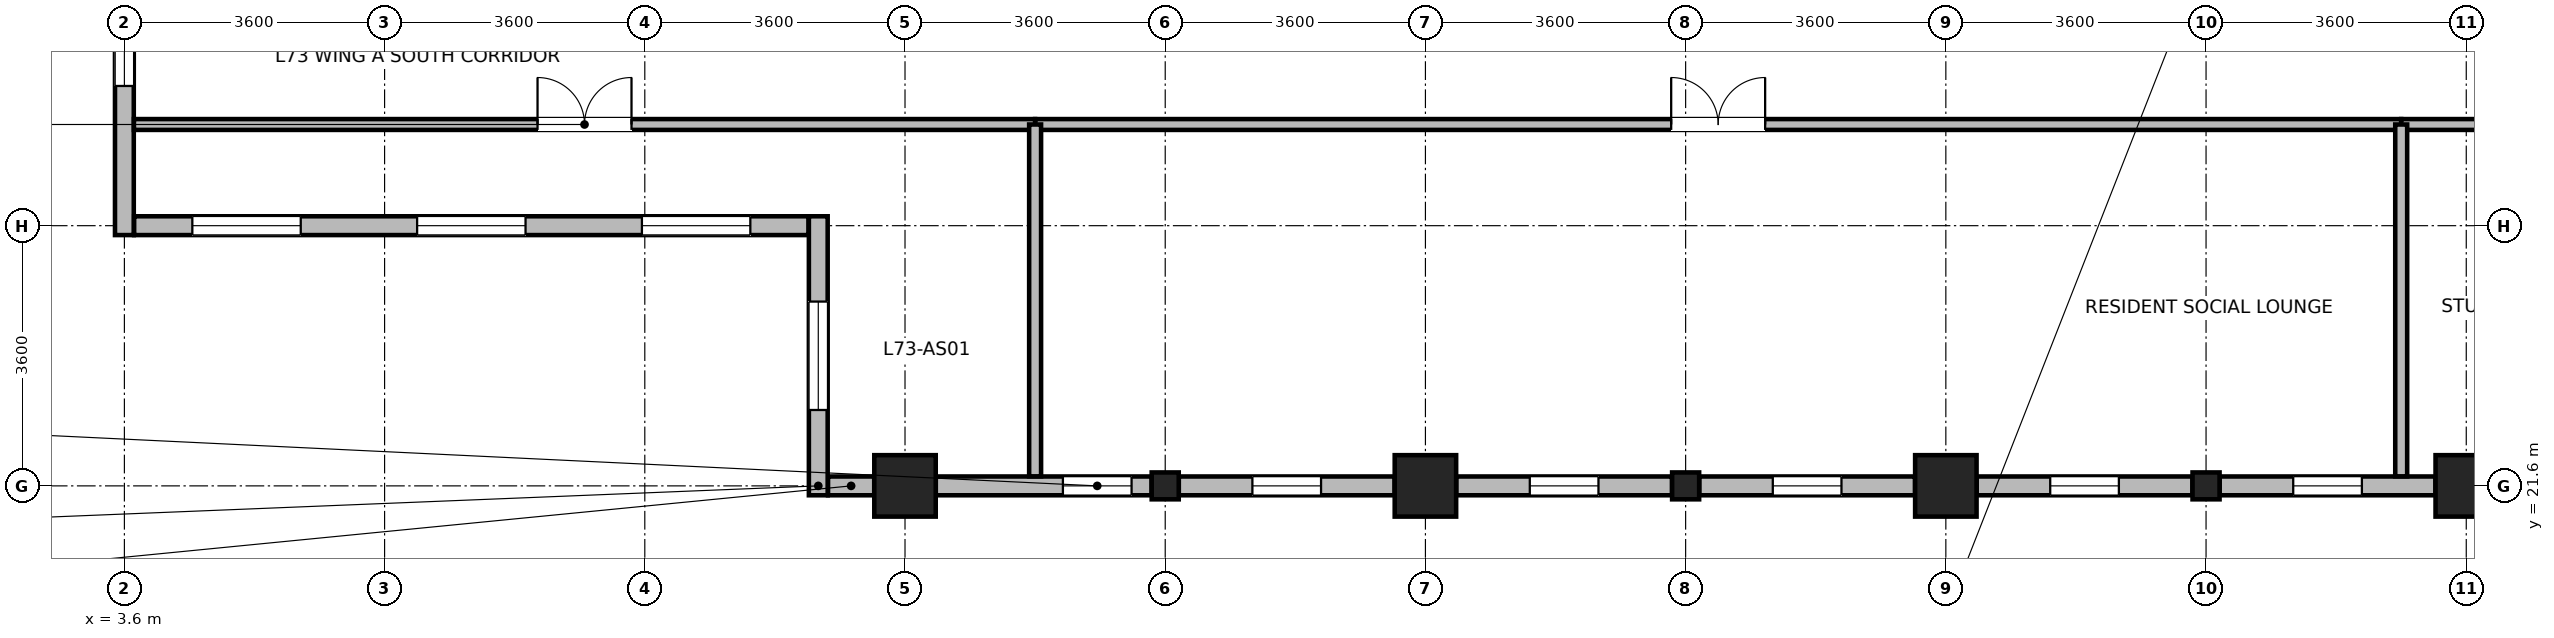
"""IFC4 building model, lengths in metres.
Left out: names, types, materials, properties, quantities, classifications, styles, units other than length and angle.
Written with IfcOpenShell. Run it as: python <this file> out.ifc"""

import sys

from ifc_helpers import new_model, si_unit, direction, frame, frame_2d, origin, origin_2d, place, context, subcontext, project, spatial, rectangle, i_section, extrude, source, transform, mapped, element, fill, save


model = new_model("IFC4")
c1 = context("Model", 3, precision=1e-05, world=origin(), true_north=direction((0.0, 1.0)))
c2 = subcontext(c1, "Body", "Model", "MODEL_VIEW")
j1 = project(units=[si_unit("LENGTHUNIT", "METRE"), si_unit("PLANEANGLEUNIT", "RADIAN")], contexts=[c1])
p1 = place(None, origin())
s1 = spatial("IfcSite", under=j1, at=p1, CompositionType="ELEMENT")
p2 = place(p1, origin())
s2 = spatial("IfcBuilding", under=s1, at=p2, CompositionType="ELEMENT")
p3 = place(p2, frame((0.0, 0.0, 283.2)))
s3 = spatial("IfcBuildingStorey", under=s2, at=p3, CompositionType="ELEMENT", Elevation=283.2)
m1 = source(origin(), c2, "Body", "SweptSolid", [
    extrude(rectangle(XDim=0.85, YDim=0.85, at=origin_2d()), origin(), (0.0, 0.0, 1.0), 3.7),
])
for number, where, z_axis, x_axis in (
    (1, (14.4, 21.6, 0.0), (0.0, 0.0, 1.0), (1.0, 0.0, 0.0)),
    (2, (21.6, 21.6, 0.0), (0.0, 0.0, 1.0), (1.0, 0.0, 0.0)),
    (3, (28.8, 21.6, 0.0), (0.0, 0.0, 1.0), (1.0, 0.0, 0.0)),
    (4, (36.0, 21.6, 0.0), (0.0, 0.0, 1.0), (1.0, 0.0, 0.0)),
):
    element("IfcColumn", number, at=place(p3, frame(where, z_axis=z_axis, x_axis=x_axis)), inside=s3, PredefinedType="COLUMN", context=c2, shape_type="MappedRepresentation", body=[
        mapped(m1, transform((0.0, 0.0, 0.0), x_axis=(1.0, 0.0, 0.0), y_axis=(0.0, 1.0, 0.0), z_axis=(0.0, 0.0, 1.0), scale=1.0)),
    ])
m2 = source(origin(), c2, "Body", "SweptSolid", [
    extrude(i_section(OverallWidth=0.374, OverallDepth=0.372, WebThickness=0.015, FlangeThickness=0.026, FilletRadius=0.015, at=origin_2d()), origin(), (0.0, 0.0, 1.0), 3.7),
])
for number, where, z_axis, x_axis in (
    (5, (18.0, 21.6, 0.0), (0.0, 0.0, 1.0), (1.0, 0.0, 0.0)),
    (6, (25.2, 21.6, 0.0), (0.0, 0.0, 1.0), (1.0, 0.0, 0.0)),
    (7, (32.4, 21.6, 0.0), (0.0, 0.0, 1.0), (1.0, 0.0, 0.0)),
):
    element("IfcColumn", number, at=place(p3, frame(where, z_axis=z_axis, x_axis=x_axis)), inside=s3, PredefinedType="COLUMN", context=c2, shape_type="MappedRepresentation", body=[
        mapped(m2, transform((0.0, 0.0, 0.0), x_axis=(1.0, 0.0, 0.0), y_axis=(0.0, 1.0, 0.0), z_axis=(0.0, 0.0, 1.0), scale=1.0)),
    ])
p4 = place(p3, frame((13.974, 21.6, 0.0), z_axis=(0.0, 0.0, 1.0), x_axis=(-1.0, 0.0, 0.0)))
e8 = element("IfcWall", 8, at=p4, inside=s3, PredefinedType="STANDARD", context=c2, shape_type="SweptSolid", body=[
    extrude(rectangle(XDim=0.639, YDim=0.26, at=frame_2d((0.32, 0.0))), origin(), (0.0, 0.0, 1.0), 3.455),
])
p5 = place(p3, frame((17.812, 21.6, 0.0), z_axis=(0.0, 0.0, 1.0), x_axis=(-1.0, 0.0, 0.0)))
e9 = element("IfcWall", 9, at=p5, inside=s3, PredefinedType="STANDARD", context=c2, shape_type="SweptSolid", body=[
    extrude(rectangle(XDim=2.986, YDim=0.26, at=frame_2d((1.493, 0.0))), origin(), (0.0, 0.0, 1.0), 3.055),
])
p6 = place(p5, frame((0.278, 0.0, 0.85)))
e10 = element("IfcOpeningElement", 10, at=p6, cuts=e9, PredefinedType="OPENING", context=c2, shape_type="SweptSolid", body=[
    extrude(rectangle(XDim=0.95, YDim=1.75, at=frame_2d((0.475, 0.875))), frame((0.0, 0.14, 0.0), z_axis=(0.0, -1.0, 0.0), x_axis=(1.0, 0.0, 0.0)), (0.0, 0.0, 1.0), 0.28),
])
p7 = place(p3, frame((21.174, 21.6, 0.0), z_axis=(0.0, 0.0, 1.0), x_axis=(-1.0, 0.0, 0.0)))
e11 = element("IfcWall", 11, at=p7, inside=s3, PredefinedType="STANDARD", context=c2, shape_type="SweptSolid", body=[
    extrude(rectangle(XDim=2.986, YDim=0.26, at=frame_2d((1.493, 0.0))), origin(), (0.0, 0.0, 1.0), 3.055),
])
p8 = place(p7, frame((1.018, 0.0, 0.85)))
e12 = element("IfcOpeningElement", 12, at=p8, cuts=e11, PredefinedType="OPENING", context=c2, shape_type="SweptSolid", body=[
    extrude(rectangle(XDim=0.95, YDim=1.75, at=frame_2d((0.475, 0.875))), frame((0.0, 0.14, 0.0), z_axis=(0.0, -1.0, 0.0), x_axis=(1.0, 0.0, 0.0)), (0.0, 0.0, 1.0), 0.28),
])
p9 = place(p3, frame((25.012, 21.6, 0.0), z_axis=(0.0, 0.0, 1.0), x_axis=(-1.0, 0.0, 0.0)))
e13 = element("IfcWall", 13, at=p9, inside=s3, PredefinedType="STANDARD", context=c2, shape_type="SweptSolid", body=[
    extrude(rectangle(XDim=2.986, YDim=0.26, at=frame_2d((1.493, 0.0))), origin(), (0.0, 0.0, 1.0), 3.055),
])
p10 = place(p9, frame((1.018, 0.0, 0.85)))
e14 = element("IfcOpeningElement", 14, at=p10, cuts=e13, PredefinedType="OPENING", context=c2, shape_type="SweptSolid", body=[
    extrude(rectangle(XDim=0.95, YDim=1.75, at=frame_2d((0.475, 0.875))), frame((0.0, 0.14, 0.0), z_axis=(0.0, -1.0, 0.0), x_axis=(1.0, 0.0, 0.0)), (0.0, 0.0, 1.0), 0.28),
])
p11 = place(p3, frame((28.374, 21.6, 0.0), z_axis=(0.0, 0.0, 1.0), x_axis=(-1.0, 0.0, 0.0)))
e15 = element("IfcWall", 15, at=p11, inside=s3, PredefinedType="STANDARD", context=c2, shape_type="SweptSolid", body=[
    extrude(rectangle(XDim=2.986, YDim=0.26, at=frame_2d((1.493, 0.0))), origin(), (0.0, 0.0, 1.0), 3.055),
])
p12 = place(p11, frame((1.018, 0.0, 0.85)))
e16 = element("IfcOpeningElement", 16, at=p12, cuts=e15, PredefinedType="OPENING", context=c2, shape_type="SweptSolid", body=[
    extrude(rectangle(XDim=0.95, YDim=1.75, at=frame_2d((0.475, 0.875))), frame((0.0, 0.14, 0.0), z_axis=(0.0, -1.0, 0.0), x_axis=(1.0, 0.0, 0.0)), (0.0, 0.0, 1.0), 0.28),
])
p13 = place(p3, frame((32.212, 21.6, 0.0), z_axis=(0.0, 0.0, 1.0), x_axis=(-1.0, 0.0, 0.0)))
e17 = element("IfcWall", 17, at=p13, inside=s3, PredefinedType="STANDARD", context=c2, shape_type="SweptSolid", body=[
    extrude(rectangle(XDim=2.986, YDim=0.26, at=frame_2d((1.493, 0.0))), origin(), (0.0, 0.0, 1.0), 3.055),
])
p14 = place(p13, frame((1.018, 0.0, 0.85)))
e18 = element("IfcOpeningElement", 18, at=p14, cuts=e17, PredefinedType="OPENING", context=c2, shape_type="SweptSolid", body=[
    extrude(rectangle(XDim=0.95, YDim=1.75, at=frame_2d((0.475, 0.875))), frame((0.0, 0.14, 0.0), z_axis=(0.0, -1.0, 0.0), x_axis=(1.0, 0.0, 0.0)), (0.0, 0.0, 1.0), 0.28),
])
p15 = place(p3, frame((35.574, 21.6, 0.0), z_axis=(0.0, 0.0, 1.0), x_axis=(-1.0, 0.0, 0.0)))
e19 = element("IfcWall", 19, at=p15, inside=s3, PredefinedType="STANDARD", context=c2, shape_type="SweptSolid", body=[
    extrude(rectangle(XDim=2.986, YDim=0.26, at=frame_2d((1.493, 0.0))), origin(), (0.0, 0.0, 1.0), 3.055),
])
p16 = place(p15, frame((1.018, 0.0, 0.85)))
e20 = element("IfcOpeningElement", 20, at=p16, cuts=e19, PredefinedType="OPENING", context=c2, shape_type="SweptSolid", body=[
    extrude(rectangle(XDim=0.95, YDim=1.75, at=frame_2d((0.475, 0.875))), frame((0.0, 0.14, 0.0), z_axis=(0.0, -1.0, 0.0), x_axis=(1.0, 0.0, 0.0)), (0.0, 0.0, 1.0), 0.28),
])
p17 = place(p3, frame((3.6, 25.07, 0.0), z_axis=(0.0, 0.0, 1.0), x_axis=(0.0, 1.0, 0.0)))
e21 = element("IfcWall", 21, at=p17, inside=s3, PredefinedType="STANDARD", context=c2, shape_type="SweptSolid", body=[
    extrude(rectangle(XDim=3.393, YDim=0.26, at=frame_2d((1.696, 0.0))), origin(), (0.0, 0.0, 1.0), 3.455),
])
p18 = place(p17, frame((2.063, 0.0, 0.85)))
e22 = element("IfcOpeningElement", 22, at=p18, cuts=e21, PredefinedType="OPENING", context=c2, shape_type="SweptSolid", body=[
    extrude(rectangle(XDim=0.95, YDim=1.75, at=frame_2d((0.475, 0.875))), frame((0.0, 0.14, 0.0), z_axis=(0.0, -1.0, 0.0), x_axis=(1.0, 0.0, 0.0)), (0.0, 0.0, 1.0), 0.28),
])
p19 = place(p3, frame((13.065, 25.2, 0.0), z_axis=(0.0, 0.0, 1.0), x_axis=(-1.0, 0.0, 0.0)))
e23 = element("IfcWall", 23, at=p19, inside=s3, PredefinedType="STANDARD", context=c2, shape_type="SweptSolid", body=[
    extrude(rectangle(XDim=9.33, YDim=0.26, at=frame_2d((4.665, 0.0))), origin(), (0.0, 0.0, 1.0), 3.455),
])
p20 = place(p19, frame((0.805, 0.0, 0.85)))
e24 = element("IfcOpeningElement", 24, at=p20, cuts=e23, PredefinedType="OPENING", context=c2, shape_type="SweptSolid", body=[
    extrude(rectangle(XDim=1.5, YDim=1.85, at=frame_2d((0.75, 0.925))), frame((0.0, 0.14, 0.0), z_axis=(0.0, -1.0, 0.0), x_axis=(1.0, 0.0, 0.0)), (0.0, 0.0, 1.0), 0.28),
])
p21 = place(p19, frame((3.915, 0.0, 0.85)))
e25 = element("IfcOpeningElement", 25, at=p21, cuts=e23, PredefinedType="OPENING", context=c2, shape_type="SweptSolid", body=[
    extrude(rectangle(XDim=1.5, YDim=1.85, at=frame_2d((0.75, 0.925))), frame((0.0, 0.14, 0.0), z_axis=(0.0, -1.0, 0.0), x_axis=(1.0, 0.0, 0.0)), (0.0, 0.0, 1.0), 0.28),
])
p22 = place(p19, frame((7.025, 0.0, 0.85)))
e26 = element("IfcOpeningElement", 26, at=p22, cuts=e23, PredefinedType="OPENING", context=c2, shape_type="SweptSolid", body=[
    extrude(rectangle(XDim=1.5, YDim=1.85, at=frame_2d((0.75, 0.925))), frame((0.0, 0.14, 0.0), z_axis=(0.0, -1.0, 0.0), x_axis=(1.0, 0.0, 0.0)), (0.0, 0.0, 1.0), 0.28),
])
p23 = place(p3, frame((13.2, 21.47, 0.0), z_axis=(0.0, 0.0, 1.0), x_axis=(0.0, 1.0, 0.0)))
e27 = element("IfcWall", 27, at=p23, inside=s3, PredefinedType="STANDARD", context=c2, shape_type="SweptSolid", body=[
    extrude(rectangle(XDim=3.86, YDim=0.26, at=frame_2d((1.93, 0.0))), origin(), (0.0, 0.0, 1.0), 3.455),
])
p24 = place(p23, frame((1.18, 0.0, 0.85)))
e28 = element("IfcOpeningElement", 28, at=p24, cuts=e27, PredefinedType="OPENING", context=c2, shape_type="SweptSolid", body=[
    extrude(rectangle(XDim=1.5, YDim=1.85, at=frame_2d((0.75, 0.925))), frame((0.0, 0.14, 0.0), z_axis=(0.0, -1.0, 0.0), x_axis=(1.0, 0.0, 0.0)), (0.0, 0.0, 1.0), 0.28),
])
p25 = place(p3, frame((16.2, 26.6, 0.0), z_axis=(0.0, 0.0, 1.0), x_axis=(1.0, 0.0, 0.0)))
e29 = element("IfcWall", 29, at=p25, inside=s3, PredefinedType="PARTITIONING", context=c2, shape_type="SweptSolid", body=[
    extrude(rectangle(XDim=18.9, YDim=0.15, at=frame_2d((9.45, 0.0))), origin(), (0.0, 0.0, 1.0), 3.455),
])
p26 = place(p25, frame((8.8, 0.0, 0.0)))
e30 = element("IfcOpeningElement", 30, at=p26, cuts=e29, PredefinedType="OPENING", context=c2, shape_type="SweptSolid", body=[
    extrude(rectangle(XDim=1.3, YDim=2.12, at=frame_2d((0.65, 1.06))), frame((0.0, 0.085, 0.0), z_axis=(0.0, -1.0, 0.0), x_axis=(1.0, 0.0, 0.0)), (0.0, 0.0, 1.0), 0.17),
])
p27 = place(p3, frame((3.732, 26.6, 0.0), z_axis=(0.0, 0.0, 1.0), x_axis=(1.0, 0.0, 0.0)))
e31 = element("IfcWall", 31, at=p27, inside=s3, PredefinedType="PARTITIONING", context=c2, shape_type="SweptSolid", body=[
    extrude(rectangle(XDim=12.468, YDim=0.15, at=frame_2d((6.234, 0.0))), origin(), (0.0, 0.0, 1.0), 3.455),
])
p28 = place(p27, frame((5.584, 0.0, 0.0)))
e32 = element("IfcOpeningElement", 32, at=p28, cuts=e31, PredefinedType="OPENING", context=c2, shape_type="SweptSolid", body=[
    extrude(rectangle(XDim=1.3, YDim=2.12, at=frame_2d((0.65, 1.06))), frame((0.0, 0.085, 0.0), z_axis=(0.0, -1.0, 0.0), x_axis=(1.0, 0.0, 0.0)), (0.0, 0.0, 1.0), 0.17),
])
p29 = place(p3, frame((35.1, 26.6, 0.0), z_axis=(0.0, 0.0, 1.0), x_axis=(1.0, 0.0, 0.0)))
e33 = element("IfcWall", 33, at=p29, inside=s3, PredefinedType="PARTITIONING", context=c2, shape_type="SweptSolid", body=[
    extrude(rectangle(XDim=9.16, YDim=0.15, at=frame_2d((4.58, 0.0))), origin(), (0.0, 0.0, 1.0), 3.455),
])
p30 = place(p29, frame((4.105, 0.0, 0.0)))
e34 = element("IfcOpeningElement", 34, at=p30, cuts=e33, PredefinedType="OPENING", context=c2, shape_type="SweptSolid", body=[
    extrude(rectangle(XDim=0.95, YDim=2.1, at=frame_2d((0.475, 1.05))), frame((0.0, 0.085, 0.0), z_axis=(0.0, -1.0, 0.0), x_axis=(1.0, 0.0, 0.0)), (0.0, 0.0, 1.0), 0.17),
])
for number, where, z_axis, x_axis in (
    (35, (16.2, 21.732, 0.0), (0.0, 0.0, 1.0), (0.0, 1.0, 0.0)),
    (36, (35.1, 21.732, 0.0), (0.0, 0.0, 1.0), (0.0, 1.0, 0.0)),
):
    element("IfcWall", number, at=place(p3, frame(where, z_axis=z_axis, x_axis=x_axis)), inside=s3, PredefinedType="PARTITIONING", context=c2, shape_type="SweptSolid", body=[
        extrude(rectangle(XDim=4.868, YDim=0.165, at=frame_2d((2.434, 0.0))), origin(), (0.0, 0.0, 1.0), 3.455),
    ])
p31 = place(p6, origin())
e37 = element("IfcWindow", 37, at=p31, inside=s3, PartitioningType="SINGLE_PANEL", PredefinedType="WINDOW", context=c2, shape_type="SweptSolid", body=[
    extrude(rectangle(XDim=0.95, YDim=1.75, at=frame_2d((0.475, 0.875))), frame((0.0, 0.03, 0.0), z_axis=(0.0, -1.0, 0.0), x_axis=(1.0, 0.0, 0.0)), (0.0, 0.0, 1.0), 0.06),
])
fill(e10, e37)
p32 = place(p8, origin())
e38 = element("IfcWindow", 38, at=p32, inside=s3, PartitioningType="SINGLE_PANEL", PredefinedType="WINDOW", context=c2, shape_type="SweptSolid", body=[
    extrude(rectangle(XDim=0.95, YDim=1.75, at=frame_2d((0.475, 0.875))), frame((0.0, 0.03, 0.0), z_axis=(0.0, -1.0, 0.0), x_axis=(1.0, 0.0, 0.0)), (0.0, 0.0, 1.0), 0.06),
])
fill(e12, e38)
p33 = place(p10, origin())
e39 = element("IfcWindow", 39, at=p33, inside=s3, PartitioningType="SINGLE_PANEL", PredefinedType="WINDOW", context=c2, shape_type="SweptSolid", body=[
    extrude(rectangle(XDim=0.95, YDim=1.75, at=frame_2d((0.475, 0.875))), frame((0.0, 0.03, 0.0), z_axis=(0.0, -1.0, 0.0), x_axis=(1.0, 0.0, 0.0)), (0.0, 0.0, 1.0), 0.06),
])
fill(e14, e39)
p34 = place(p12, origin())
e40 = element("IfcWindow", 40, at=p34, inside=s3, PartitioningType="SINGLE_PANEL", PredefinedType="WINDOW", context=c2, shape_type="SweptSolid", body=[
    extrude(rectangle(XDim=0.95, YDim=1.75, at=frame_2d((0.475, 0.875))), frame((0.0, 0.03, 0.0), z_axis=(0.0, -1.0, 0.0), x_axis=(1.0, 0.0, 0.0)), (0.0, 0.0, 1.0), 0.06),
])
fill(e16, e40)
p35 = place(p14, origin())
e41 = element("IfcWindow", 41, at=p35, inside=s3, PartitioningType="SINGLE_PANEL", PredefinedType="WINDOW", context=c2, shape_type="SweptSolid", body=[
    extrude(rectangle(XDim=0.95, YDim=1.75, at=frame_2d((0.475, 0.875))), frame((0.0, 0.03, 0.0), z_axis=(0.0, -1.0, 0.0), x_axis=(1.0, 0.0, 0.0)), (0.0, 0.0, 1.0), 0.06),
])
fill(e18, e41)
p36 = place(p16, origin())
e42 = element("IfcWindow", 42, at=p36, inside=s3, PartitioningType="SINGLE_PANEL", PredefinedType="WINDOW", context=c2, shape_type="SweptSolid", body=[
    extrude(rectangle(XDim=0.95, YDim=1.75, at=frame_2d((0.475, 0.875))), frame((0.0, 0.03, 0.0), z_axis=(0.0, -1.0, 0.0), x_axis=(1.0, 0.0, 0.0)), (0.0, 0.0, 1.0), 0.06),
])
fill(e20, e42)
p37 = place(p18, origin())
e43 = element("IfcWindow", 43, at=p37, inside=s3, PartitioningType="SINGLE_PANEL", PredefinedType="WINDOW", context=c2, shape_type="SweptSolid", body=[
    extrude(rectangle(XDim=0.95, YDim=1.75, at=frame_2d((0.475, 0.875))), frame((0.0, 0.03, 0.0), z_axis=(0.0, -1.0, 0.0), x_axis=(1.0, 0.0, 0.0)), (0.0, 0.0, 1.0), 0.06),
])
fill(e22, e43)
p38 = place(p20, origin())
e44 = element("IfcWindow", 44, at=p38, inside=s3, PartitioningType="SINGLE_PANEL", PredefinedType="WINDOW", context=c2, shape_type="SweptSolid", body=[
    extrude(rectangle(XDim=1.5, YDim=1.85, at=frame_2d((0.75, 0.925))), frame((0.0, 0.03, 0.0), z_axis=(0.0, -1.0, 0.0), x_axis=(1.0, 0.0, 0.0)), (0.0, 0.0, 1.0), 0.06),
])
fill(e24, e44)
p39 = place(p21, origin())
e45 = element("IfcWindow", 45, at=p39, inside=s3, PartitioningType="SINGLE_PANEL", PredefinedType="WINDOW", context=c2, shape_type="SweptSolid", body=[
    extrude(rectangle(XDim=1.5, YDim=1.85, at=frame_2d((0.75, 0.925))), frame((0.0, 0.03, 0.0), z_axis=(0.0, -1.0, 0.0), x_axis=(1.0, 0.0, 0.0)), (0.0, 0.0, 1.0), 0.06),
])
fill(e25, e45)
p40 = place(p22, origin())
e46 = element("IfcWindow", 46, at=p40, inside=s3, PartitioningType="SINGLE_PANEL", PredefinedType="WINDOW", context=c2, shape_type="SweptSolid", body=[
    extrude(rectangle(XDim=1.5, YDim=1.85, at=frame_2d((0.75, 0.925))), frame((0.0, 0.03, 0.0), z_axis=(0.0, -1.0, 0.0), x_axis=(1.0, 0.0, 0.0)), (0.0, 0.0, 1.0), 0.06),
])
fill(e26, e46)
p41 = place(p24, origin())
e47 = element("IfcWindow", 47, at=p41, inside=s3, PartitioningType="SINGLE_PANEL", PredefinedType="WINDOW", context=c2, shape_type="SweptSolid", body=[
    extrude(rectangle(XDim=1.5, YDim=1.85, at=frame_2d((0.75, 0.925))), frame((0.0, 0.03, 0.0), z_axis=(0.0, -1.0, 0.0), x_axis=(1.0, 0.0, 0.0)), (0.0, 0.0, 1.0), 0.06),
])
fill(e28, e47)
p42 = place(p26, origin())
e48 = element("IfcDoor", 48, at=p42, inside=s3, OperationType="DOUBLE_DOOR_SINGLE_SWING", PredefinedType="DOOR", context=c2, shape_type="SweptSolid", body=[
    extrude(rectangle(XDim=1.3, YDim=2.12, at=frame_2d((0.65, 1.06))), frame((0.0, 0.025, 0.0), z_axis=(0.0, -1.0, 0.0), x_axis=(1.0, 0.0, 0.0)), (0.0, 0.0, 1.0), 0.05),
])
fill(e30, e48)
p43 = place(p28, origin())
e49 = element("IfcDoor", 49, at=p43, inside=s3, OperationType="DOUBLE_DOOR_SINGLE_SWING", PredefinedType="DOOR", context=c2, shape_type="SweptSolid", body=[
    extrude(rectangle(XDim=1.3, YDim=2.12, at=frame_2d((0.65, 1.06))), frame((0.0, 0.025, 0.0), z_axis=(0.0, -1.0, 0.0), x_axis=(1.0, 0.0, 0.0)), (0.0, 0.0, 1.0), 0.05),
])
fill(e32, e49)
save(model, sys.argv[1])
